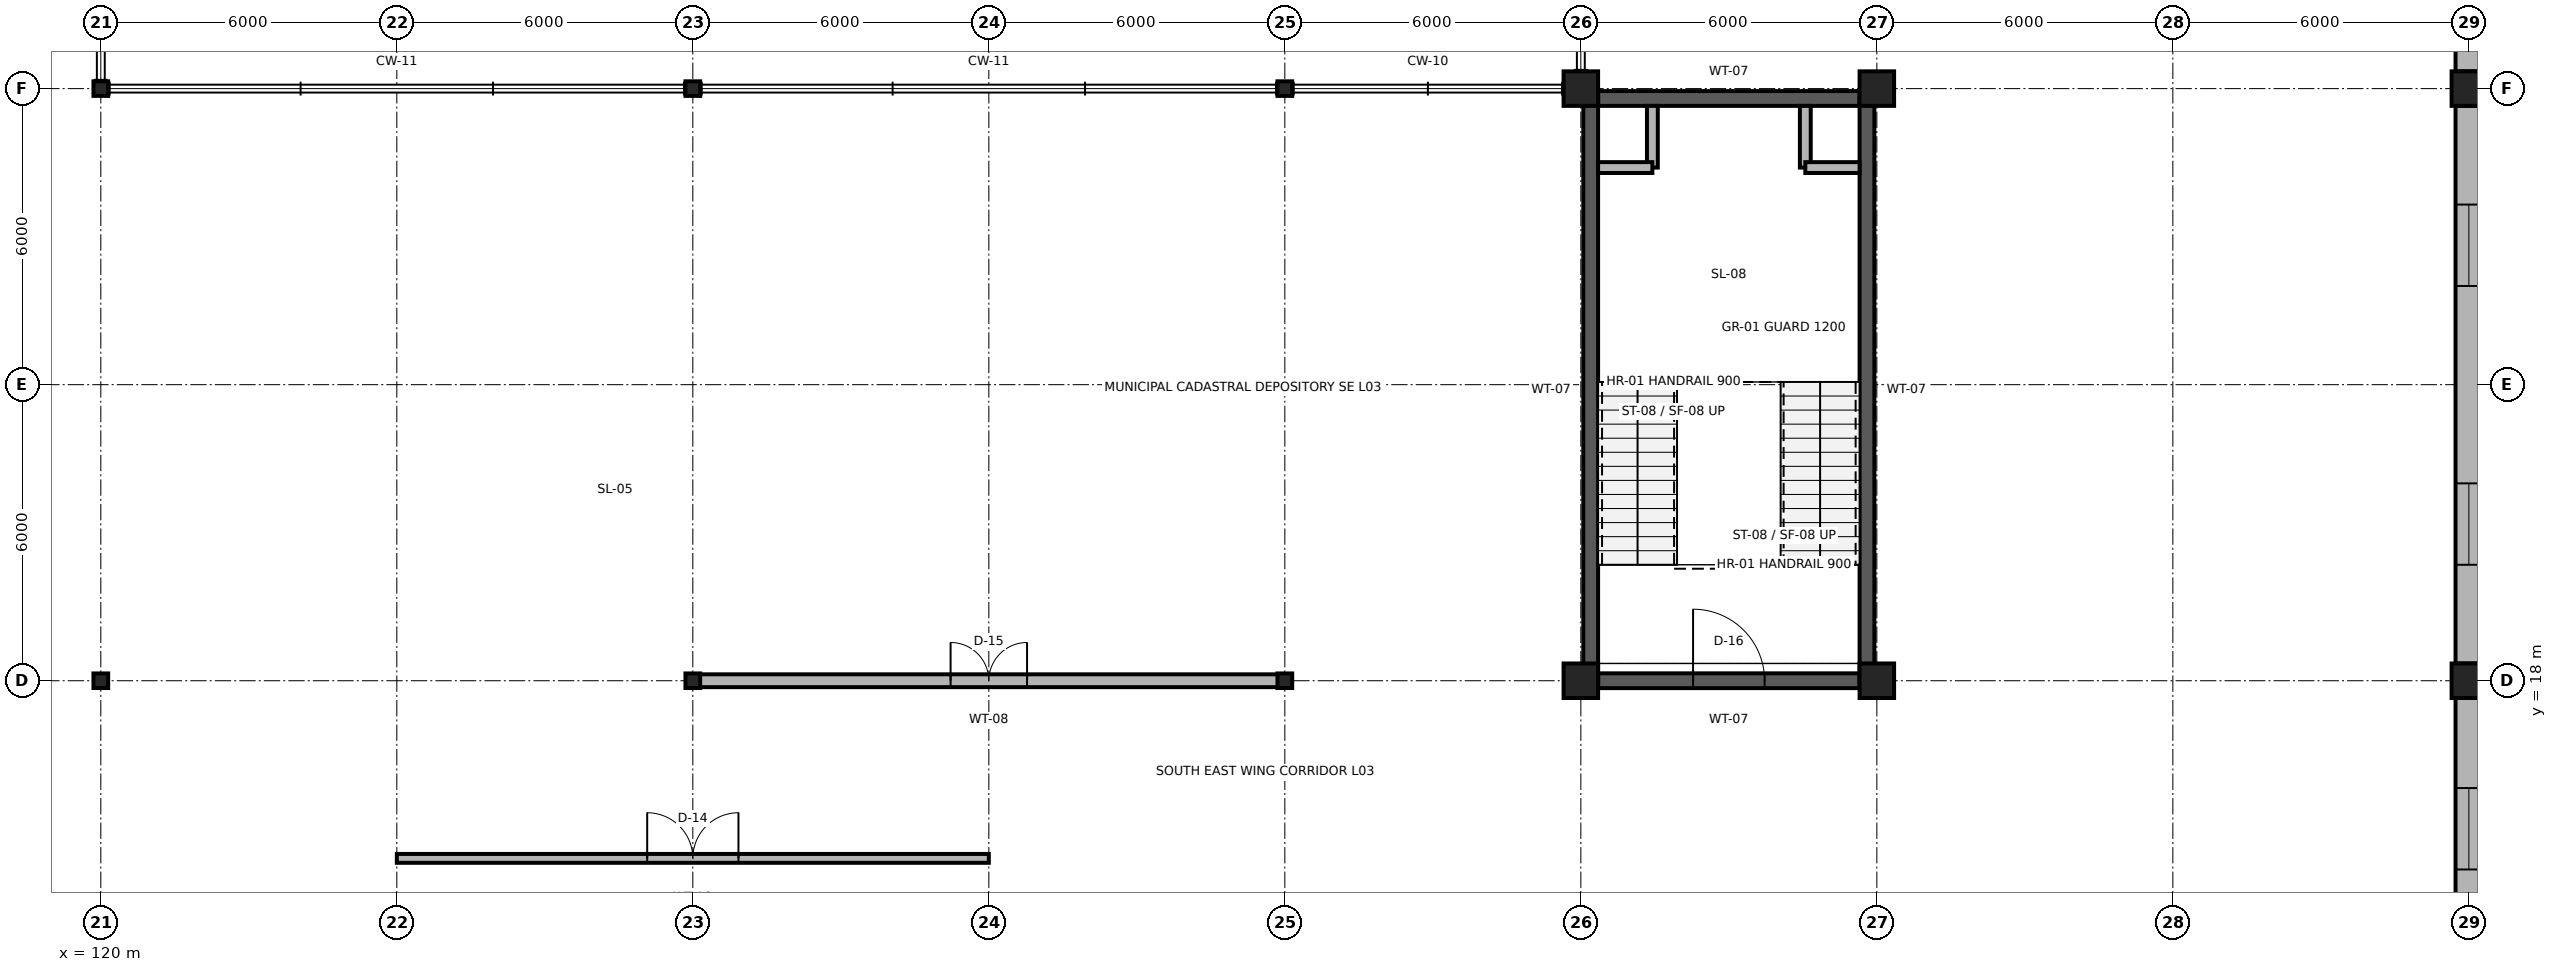
"""IFC4 building model, lengths in metres.
Left out: names, types, materials, properties, quantities, classifications, styles, units other than length and angle.
Written with IfcOpenShell. Run it as: python <this file> out.ifc"""

import sys

from ifc_helpers import new_model, si_unit, direction, frame, frame_2d, origin, origin_2d, place, context, subcontext, project, spatial, rectangle, i_section, extrude, element, fill, save


model = new_model("IFC4")
c1 = context("Model", 3, precision=1e-05, world=origin(), true_north=direction((0.0, 1.0)))
c2 = subcontext(c1, "Body", "Model", "MODEL_VIEW")
j1 = project(units=[si_unit("LENGTHUNIT", "METRE"), si_unit("PLANEANGLEUNIT", "RADIAN")], contexts=[c1])
p1 = place(None, origin())
s1 = spatial("IfcSite", under=j1, at=p1, CompositionType="ELEMENT")
p2 = place(p1, origin())
s2 = spatial("IfcBuilding", under=s1, at=p2, CompositionType="ELEMENT")
p3 = place(p2, frame((0.0, 0.0, 12.0)))
s3 = spatial("IfcBuildingStorey", under=s2, at=p3, CompositionType="ELEMENT", Elevation=12.0)
for number, where, z_axis, x_axis in (
    (1, (120.0, 18.0, 0.0), (0.0, 0.0, 1.0), (1.0, 0.0, 0.0)),
    (2, (132.0, 18.0, 0.0), (0.0, 0.0, 1.0), (1.0, 0.0, 0.0)),
    (3, (144.0, 18.0, 0.0), (0.0, 0.0, 1.0), (1.0, 0.0, 0.0)),
):
    element("IfcColumn", number, at=place(p3, frame(where, z_axis=z_axis, x_axis=x_axis)), inside=s3, PredefinedType="COLUMN", context=c2, shape_type="SweptSolid", body=[
        extrude(i_section(OverallWidth=0.299, OverallDepth=0.296, WebThickness=0.009, FlangeThickness=0.014, FilletRadius=0.018, at=origin_2d()), origin(), (0.0, 0.0, 1.0), 4.5),
    ])
for number, where, z_axis, x_axis in (
    (4, (150.0, 18.0, 0.0), (0.0, 0.0, 1.0), (1.0, 0.0, 0.0)),
    (5, (156.0, 18.0, 0.0), (0.0, 0.0, 1.0), (1.0, 0.0, 0.0)),
    (6, (168.0, 18.0, 0.0), (0.0, 0.0, 1.0), (1.0, 0.0, 0.0)),
):
    element("IfcColumn", number, at=place(p3, frame(where, z_axis=z_axis, x_axis=x_axis)), inside=s3, PredefinedType="COLUMN", context=c2, shape_type="SweptSolid", body=[
        extrude(rectangle(XDim=0.7, YDim=0.7, at=origin_2d()), origin(), (0.0, 0.0, 1.0), 4.5),
    ])
for number, where, z_axis, x_axis in (
    (7, (120.0, 30.0, 0.0), (0.0, 0.0, 1.0), (1.0, 0.0, 0.0)),
    (8, (132.0, 30.0, 0.0), (0.0, 0.0, 1.0), (1.0, 0.0, 0.0)),
    (9, (144.0, 30.0, 0.0), (0.0, 0.0, 1.0), (1.0, 0.0, 0.0)),
):
    element("IfcColumn", number, at=place(p3, frame(where, z_axis=z_axis, x_axis=x_axis)), inside=s3, PredefinedType="COLUMN", context=c2, shape_type="SweptSolid", body=[
        extrude(i_section(OverallWidth=0.299, OverallDepth=0.296, WebThickness=0.009, FlangeThickness=0.014, FilletRadius=0.018, at=origin_2d()), origin(), (0.0, 0.0, 1.0), 4.5),
    ])
for number, where, z_axis, x_axis in (
    (10, (150.0, 30.0, 0.0), (0.0, 0.0, 1.0), (1.0, 0.0, 0.0)),
    (11, (156.0, 30.0, 0.0), (0.0, 0.0, 1.0), (1.0, 0.0, 0.0)),
    (12, (168.0, 30.0, 0.0), (0.0, 0.0, 1.0), (1.0, 0.0, 0.0)),
):
    element("IfcColumn", number, at=place(p3, frame(where, z_axis=z_axis, x_axis=x_axis)), inside=s3, PredefinedType="COLUMN", context=c2, shape_type="SweptSolid", body=[
        extrude(rectangle(XDim=0.7, YDim=0.7, at=origin_2d()), origin(), (0.0, 0.0, 1.0), 4.5),
    ])
p4 = place(p3, frame((168.0, 12.35, 0.0), z_axis=(0.0, 0.0, 1.0), x_axis=(0.0, 1.0, 0.0)))
e13 = element("IfcWall", 13, at=p4, inside=s3, PredefinedType="SOLIDWALL", context=c2, shape_type="SweptSolid", body=[
    extrude(rectangle(XDim=5.3, YDim=0.54, at=frame_2d((2.65, 0.0))), origin(), (0.0, 0.0, 1.0), 3.77),
])
p5 = place(p4, frame((1.825, 0.0, 0.85)))
e14 = element("IfcOpeningElement", 14, at=p5, cuts=e13, PredefinedType="OPENING", context=c2, shape_type="SweptSolid", body=[
    extrude(rectangle(XDim=1.65, YDim=2.3, at=frame_2d((0.825, 1.15))), frame((0.0, 0.285, 0.0), z_axis=(0.0, -1.0, 0.0), x_axis=(1.0, 0.0, 0.0)), (0.0, 0.0, 1.0), 0.57),
])
p6 = place(p3, frame((168.0, 18.35, 0.0), z_axis=(0.0, 0.0, 1.0), x_axis=(0.0, 1.0, 0.0)))
e15 = element("IfcWall", 15, at=p6, inside=s3, PredefinedType="SOLIDWALL", context=c2, shape_type="SweptSolid", body=[
    extrude(rectangle(XDim=11.3, YDim=0.54, at=frame_2d((5.65, 0.0))), origin(), (0.0, 0.0, 1.0), 3.77),
])
p7 = place(p6, frame((2.0, 0.0, 0.85)))
e16 = element("IfcOpeningElement", 16, at=p7, cuts=e15, PredefinedType="OPENING", context=c2, shape_type="SweptSolid", body=[
    extrude(rectangle(XDim=1.65, YDim=2.3, at=frame_2d((0.825, 1.15))), frame((0.0, 0.285, 0.0), z_axis=(0.0, -1.0, 0.0), x_axis=(1.0, 0.0, 0.0)), (0.0, 0.0, 1.0), 0.57),
])
p8 = place(p6, frame((7.65, 0.0, 0.85)))
e17 = element("IfcOpeningElement", 17, at=p8, cuts=e15, PredefinedType="OPENING", context=c2, shape_type="SweptSolid", body=[
    extrude(rectangle(XDim=1.65, YDim=2.3, at=frame_2d((0.825, 1.15))), frame((0.0, 0.285, 0.0), z_axis=(0.0, -1.0, 0.0), x_axis=(1.0, 0.0, 0.0)), (0.0, 0.0, 1.0), 0.57),
])
p9 = place(p3, frame((168.0, 30.35, 0.0), z_axis=(0.0, 0.0, 1.0), x_axis=(0.0, 1.0, 0.0)))
e18 = element("IfcWall", 18, at=p9, inside=s3, PredefinedType="SOLIDWALL", context=c2, shape_type="SweptSolid", body=[
    extrude(rectangle(XDim=5.3, YDim=0.54, at=frame_2d((2.65, 0.0))), origin(), (0.0, 0.0, 1.0), 3.77),
])
p10 = place(p9, frame((1.825, 0.0, 0.85)))
e19 = element("IfcOpeningElement", 19, at=p10, cuts=e18, PredefinedType="OPENING", context=c2, shape_type="SweptSolid", body=[
    extrude(rectangle(XDim=1.65, YDim=2.3, at=frame_2d((0.825, 1.15))), frame((0.0, 0.285, 0.0), z_axis=(0.0, -1.0, 0.0), x_axis=(1.0, 0.0, 0.0)), (0.0, 0.0, 1.0), 0.57),
])
p11 = place(p3, frame((150.35, 18.0, 0.0), z_axis=(0.0, 0.0, 1.0), x_axis=(1.0, 0.0, 0.0)))
e20 = element("IfcWall", 20, at=p11, inside=s3, PredefinedType="SHEAR", context=c2, shape_type="SweptSolid", body=[
    extrude(rectangle(XDim=5.3, YDim=0.3, at=frame_2d((2.65, 0.0))), origin(), (0.0, 0.0, 1.0), 4.22),
])
p12 = place(p11, frame((1.925, 0.0, 0.0)))
e21 = element("IfcOpeningElement", 21, at=p12, cuts=e20, PredefinedType="OPENING", context=c2, shape_type="SweptSolid", body=[
    extrude(rectangle(XDim=1.45, YDim=2.25, at=frame_2d((0.725, 1.125))), frame((0.0, 0.165, 0.0), z_axis=(0.0, -1.0, 0.0), x_axis=(1.0, 0.0, 0.0)), (0.0, 0.0, 1.0), 0.33),
])
p13 = place(p3, frame((150.35, 29.8, 0.0), z_axis=(0.0, 0.0, 1.0), x_axis=(1.0, 0.0, 0.0)))
e22 = element("IfcWall", 22, at=p13, inside=s3, PredefinedType="SHEAR", context=c2, shape_type="SweptSolid", body=[
    extrude(rectangle(XDim=5.3, YDim=0.3, at=frame_2d((2.65, 0.0))), origin(), (0.0, 0.0, 1.0), 4.22),
])
for number, where, z_axis, x_axis in (
    (23, (150.2, 18.0, 0.0), (0.0, 0.0, 1.0), (0.0, 1.0, 0.0)),
    (24, (155.8, 18.0, 0.0), (0.0, 0.0, 1.0), (0.0, 1.0, 0.0)),
):
    element("IfcWall", number, at=place(p3, frame(where, z_axis=z_axis, x_axis=x_axis)), inside=s3, PredefinedType="SHEAR", context=c2, shape_type="SweptSolid", body=[
        extrude(rectangle(XDim=11.8, YDim=0.3, at=frame_2d((5.9, 0.0))), origin(), (0.0, 0.0, 1.0), 4.22),
    ])
p14 = place(p3, frame((151.45, 28.4, 0.0), z_axis=(0.0, 0.0, 1.0), x_axis=(0.0, 1.0, 0.0)))
e25 = element("IfcWall", 25, at=p14, inside=s3, PredefinedType="PARTITIONING", context=c2, shape_type="SweptSolid", body=[
    extrude(rectangle(XDim=1.25, YDim=0.22, at=frame_2d((0.625, 0.0))), origin(), (0.0, 0.0, 1.0), 4.22),
])
p15 = place(p3, frame((150.35, 28.4, 0.0), z_axis=(0.0, 0.0, 1.0), x_axis=(1.0, 0.0, 0.0)))
e26 = element("IfcWall", 26, at=p15, inside=s3, PredefinedType="PARTITIONING", context=c2, shape_type="SweptSolid", body=[
    extrude(rectangle(XDim=1.1, YDim=0.22, at=frame_2d((0.55, 0.0))), origin(), (0.0, 0.0, 1.0), 4.22),
])
p16 = place(p3, frame((154.55, 28.4, 0.0), z_axis=(0.0, 0.0, 1.0), x_axis=(0.0, 1.0, 0.0)))
e27 = element("IfcWall", 27, at=p16, inside=s3, PredefinedType="PARTITIONING", context=c2, shape_type="SweptSolid", body=[
    extrude(rectangle(XDim=1.25, YDim=0.22, at=frame_2d((0.625, 0.0))), origin(), (0.0, 0.0, 1.0), 4.22),
])
p17 = place(p3, frame((154.55, 28.4, 0.0), z_axis=(0.0, 0.0, 1.0), x_axis=(1.0, 0.0, 0.0)))
e28 = element("IfcWall", 28, at=p17, inside=s3, PredefinedType="PARTITIONING", context=c2, shape_type="SweptSolid", body=[
    extrude(rectangle(XDim=1.1, YDim=0.22, at=frame_2d((0.55, 0.0))), origin(), (0.0, 0.0, 1.0), 4.22),
])
p18 = place(p3, frame((126.0, 14.4, 0.0), z_axis=(0.0, 0.0, 1.0), x_axis=(1.0, 0.0, 0.0)))
e29 = element("IfcWall", 29, at=p18, inside=s3, PredefinedType="PARTITIONING", context=c2, shape_type="SweptSolid", body=[
    extrude(rectangle(XDim=12.0, YDim=0.18, at=frame_2d((6.0, 0.0))), origin(), (0.0, 0.0, 1.0), 4.22),
])
p19 = place(p18, frame((5.075, 0.0, 0.0)))
e30 = element("IfcOpeningElement", 30, at=p19, cuts=e29, PredefinedType="OPENING", context=c2, shape_type="SweptSolid", body=[
    extrude(rectangle(XDim=1.85, YDim=2.65, at=frame_2d((0.925, 1.325))), frame((0.0, 0.105, 0.0), z_axis=(0.0, -1.0, 0.0), x_axis=(1.0, 0.0, 0.0)), (0.0, 0.0, 1.0), 0.21),
])
p20 = place(p3, frame((132.0, 18.0, 0.0), z_axis=(0.0, 0.0, 1.0), x_axis=(1.0, 0.0, 0.0)))
e31 = element("IfcWall", 31, at=p20, inside=s3, PredefinedType="PARTITIONING", context=c2, shape_type="SweptSolid", body=[
    extrude(rectangle(XDim=12.0, YDim=0.26, at=frame_2d((6.0, 0.0))), origin(), (0.0, 0.0, 1.0), 3.638),
])
p21 = place(p20, frame((5.225, 0.0, 0.0)))
e32 = element("IfcOpeningElement", 32, at=p21, cuts=e31, PredefinedType="OPENING", context=c2, shape_type="SweptSolid", body=[
    extrude(rectangle(XDim=1.55, YDim=2.3, at=frame_2d((0.775, 1.15))), frame((0.0, 0.145, 0.0), z_axis=(0.0, -1.0, 0.0), x_axis=(1.0, 0.0, 0.0)), (0.0, 0.0, 1.0), 0.29),
])
p22 = place(p5, origin())
e33 = element("IfcWindow", 33, at=p22, inside=s3, PartitioningType="SINGLE_PANEL", PredefinedType="WINDOW", context=c2, shape_type="SweptSolid", body=[
    extrude(rectangle(XDim=1.65, YDim=2.3, at=frame_2d((0.825, 1.15))), frame((0.0, 0.03, 0.0), z_axis=(0.0, -1.0, 0.0), x_axis=(1.0, 0.0, 0.0)), (0.0, 0.0, 1.0), 0.06),
])
fill(e14, e33)
p23 = place(p7, origin())
e34 = element("IfcWindow", 34, at=p23, inside=s3, PartitioningType="SINGLE_PANEL", PredefinedType="WINDOW", context=c2, shape_type="SweptSolid", body=[
    extrude(rectangle(XDim=1.65, YDim=2.3, at=frame_2d((0.825, 1.15))), frame((0.0, 0.03, 0.0), z_axis=(0.0, -1.0, 0.0), x_axis=(1.0, 0.0, 0.0)), (0.0, 0.0, 1.0), 0.06),
])
fill(e16, e34)
p24 = place(p8, origin())
e35 = element("IfcWindow", 35, at=p24, inside=s3, PartitioningType="SINGLE_PANEL", PredefinedType="WINDOW", context=c2, shape_type="SweptSolid", body=[
    extrude(rectangle(XDim=1.65, YDim=2.3, at=frame_2d((0.825, 1.15))), frame((0.0, 0.03, 0.0), z_axis=(0.0, -1.0, 0.0), x_axis=(1.0, 0.0, 0.0)), (0.0, 0.0, 1.0), 0.06),
])
fill(e17, e35)
p25 = place(p12, origin())
e36 = element("IfcDoor", 36, at=p25, inside=s3, OperationType="SINGLE_SWING_LEFT", PredefinedType="DOOR", context=c2, shape_type="SweptSolid", body=[
    extrude(rectangle(XDim=1.45, YDim=2.25, at=frame_2d((0.725, 1.125))), frame((0.0, 0.025, 0.0), z_axis=(0.0, -1.0, 0.0), x_axis=(1.0, 0.0, 0.0)), (0.0, 0.0, 1.0), 0.05),
])
fill(e21, e36)
p26 = place(p19, origin())
e37 = element("IfcDoor", 37, at=p26, inside=s3, OperationType="DOUBLE_DOOR_SINGLE_SWING", PredefinedType="DOOR", context=c2, shape_type="SweptSolid", body=[
    extrude(rectangle(XDim=1.85, YDim=2.65, at=frame_2d((0.925, 1.325))), frame((0.0, 0.025, 0.0), z_axis=(0.0, -1.0, 0.0), x_axis=(1.0, 0.0, 0.0)), (0.0, 0.0, 1.0), 0.05),
])
fill(e30, e37)
p27 = place(p21, origin())
e38 = element("IfcDoor", 38, at=p27, inside=s3, OperationType="DOUBLE_DOOR_SINGLE_SWING", PredefinedType="DOOR", context=c2, shape_type="SweptSolid", body=[
    extrude(rectangle(XDim=1.55, YDim=2.3, at=frame_2d((0.775, 1.15))), frame((0.0, 0.025, 0.0), z_axis=(0.0, -1.0, 0.0), x_axis=(1.0, 0.0, 0.0)), (0.0, 0.0, 1.0), 0.05),
])
fill(e32, e38)
save(model, sys.argv[1])
